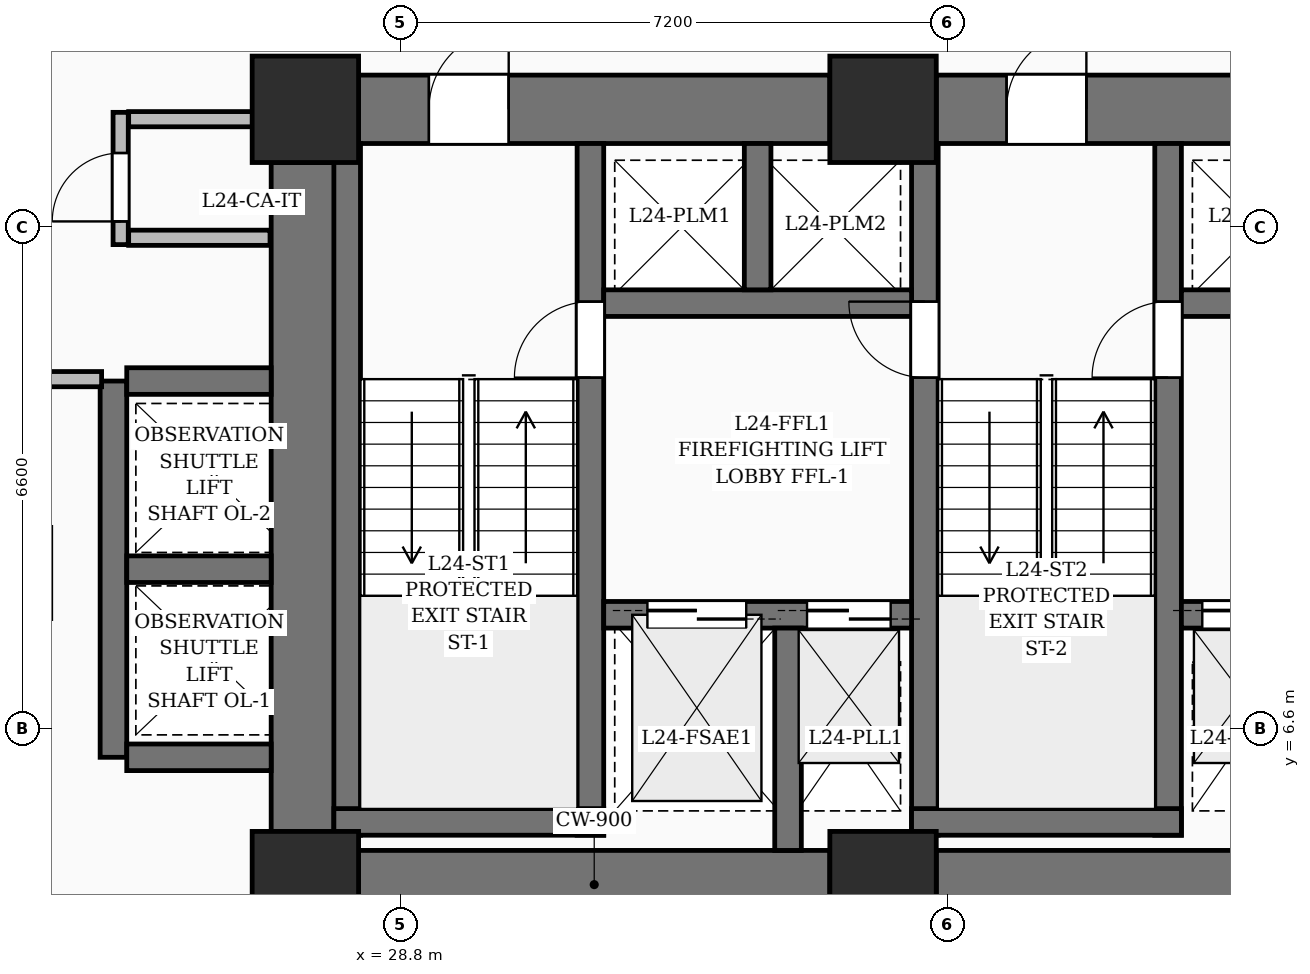
"""IFC4 building model, lengths in metres.
Left out: names, types, materials, properties, quantities, classifications, styles, units other than length and angle.
Written with IfcOpenShell. Run it as: python <this file> out.ifc"""

import sys

from ifc_helpers import new_model, si_unit, direction, frame, frame_2d, origin, origin_2d, place, context, subcontext, project, spatial, rectangle, extrude, element, fill, save


model = new_model("IFC4")
c1 = context("Model", 3, precision=1e-05, world=origin(), true_north=direction((0.0, 1.0)))
c2 = subcontext(c1, "Body", "Model", "MODEL_VIEW")
j1 = project(units=[si_unit("LENGTHUNIT", "METRE"), si_unit("PLANEANGLEUNIT", "RADIAN")], contexts=[c1])
p1 = place(None, origin())
s1 = spatial("IfcSite", under=j1, at=p1, CompositionType="ELEMENT")
p2 = place(p1, origin())
s2 = spatial("IfcBuilding", under=s1, at=p2, CompositionType="ELEMENT")
p3 = place(p2, frame((0.0, 0.0, 96.6)))
s3 = spatial("IfcBuildingStorey", under=s2, at=p3, CompositionType="ELEMENT", Elevation=96.6)
for number, where, z_axis, x_axis in (
    (1, (27.55, 4.55, 0.0), (0.0, 0.0, 1.0), (1.0, 0.0, 0.0)),
    (2, (35.15, 4.55, 0.0), (0.0, 0.0, 1.0), (1.0, 0.0, 0.0)),
    (3, (27.55, 14.75, 0.0), (0.0, 0.0, 1.0), (1.0, 0.0, 0.0)),
    (4, (35.15, 14.75, 0.0), (0.0, 0.0, 1.0), (1.0, 0.0, 0.0)),
):
    element("IfcColumn", number, at=place(p3, frame(where, z_axis=z_axis, x_axis=x_axis)), inside=s3, PredefinedType="COLUMN", context=c2, shape_type="SweptSolid", body=[
        extrude(rectangle(XDim=1.4, YDim=1.4, at=origin_2d()), origin(), (0.0, 0.0, 1.0), 3.6),
    ])
p4 = place(p3, frame((28.25, 4.55, 0.0), z_axis=(0.0, 0.0, 1.0), x_axis=(1.0, 0.0, 0.0)))
e5 = element("IfcWall", 5, at=p4, inside=s3, PredefinedType="SHEAR", context=c2, shape_type="SweptSolid", body=[
    extrude(rectangle(XDim=6.2, YDim=0.9, at=frame_2d((3.1, 0.0))), origin(), (0.0, 0.0, 1.0), 3.6),
])
p5 = place(p3, frame((35.85, 4.55, 0.0), z_axis=(0.0, 0.0, 1.0), x_axis=(1.0, 0.0, 0.0)))
e6 = element("IfcWall", 6, at=p5, inside=s3, PredefinedType="SHEAR", context=c2, shape_type="SweptSolid", body=[
    extrude(rectangle(XDim=10.5, YDim=0.9, at=frame_2d((5.25, 0.0))), origin(), (0.0, 0.0, 1.0), 3.6),
])
p6 = place(p3, frame((28.25, 14.75, 0.0), z_axis=(0.0, 0.0, 1.0), x_axis=(1.0, 0.0, 0.0)))
e7 = element("IfcWall", 7, at=p6, inside=s3, PredefinedType="SHEAR", context=c2, shape_type="SweptSolid", body=[
    extrude(rectangle(XDim=6.2, YDim=0.9, at=frame_2d((3.1, 0.0))), origin(), (0.0, 0.0, 1.0), 3.6),
])
p7 = place(p6, frame((0.925, 0.0, 0.0)))
e8 = element("IfcOpeningElement", 8, at=p7, cuts=e7, PredefinedType="OPENING", context=c2, shape_type="SweptSolid", body=[
    extrude(rectangle(XDim=1.05, YDim=2.15, at=frame_2d((0.525, 1.075))), frame((0.0, 0.46, 0.0), z_axis=(0.0, -1.0, 0.0), x_axis=(1.0, 0.0, 0.0)), (0.0, 0.0, 1.0), 0.92),
])
p8 = place(p3, frame((35.85, 14.75, 0.0), z_axis=(0.0, 0.0, 1.0), x_axis=(1.0, 0.0, 0.0)))
e9 = element("IfcWall", 9, at=p8, inside=s3, PredefinedType="SHEAR", context=c2, shape_type="SweptSolid", body=[
    extrude(rectangle(XDim=10.5, YDim=0.9, at=frame_2d((5.25, 0.0))), origin(), (0.0, 0.0, 1.0), 3.6),
])
p9 = place(p8, frame((0.925, 0.0, 0.0)))
e10 = element("IfcOpeningElement", 10, at=p9, cuts=e9, PredefinedType="OPENING", context=c2, shape_type="SweptSolid", body=[
    extrude(rectangle(XDim=1.05, YDim=2.15, at=frame_2d((0.525, 1.075))), frame((0.0, 0.46, 0.0), z_axis=(0.0, -1.0, 0.0), x_axis=(1.0, 0.0, 0.0)), (0.0, 0.0, 1.0), 0.92),
])
p10 = place(p8, frame((8.525, 0.0, 0.0)))
e11 = element("IfcOpeningElement", 11, at=p10, cuts=e9, PredefinedType="OPENING", context=c2, shape_type="SweptSolid", body=[
    extrude(rectangle(XDim=1.05, YDim=2.15, at=frame_2d((0.525, 1.075))), frame((0.0, 0.46, 0.0), z_axis=(0.0, -1.0, 0.0), x_axis=(1.0, 0.0, 0.0)), (0.0, 0.0, 1.0), 0.92),
])
p11 = place(p3, frame((27.55, 5.25, 0.0), z_axis=(0.0, 0.0, 1.0), x_axis=(0.0, 1.0, 0.0)))
e12 = element("IfcWall", 12, at=p11, inside=s3, PredefinedType="SHEAR", context=c2, shape_type="SweptSolid", body=[
    extrude(rectangle(XDim=8.8, YDim=0.9, at=frame_2d((4.4, 0.0))), origin(), (0.0, 0.0, 1.0), 3.6),
])
p12 = place(p3, frame((28.1, 5.2, 0.0), z_axis=(0.0, 0.0, 1.0), x_axis=(0.0, 1.0, 0.0)))
e13 = element("IfcWall", 13, at=p12, inside=s3, PredefinedType="SOLIDWALL", context=c2, shape_type="SweptSolid", body=[
    extrude(rectangle(XDim=9.1, YDim=0.35, at=frame_2d((4.55, 0.0))), origin(), (0.0, 0.0, 1.0), 3.6),
])
p13 = place(p3, frame((31.3, 5.2, 0.0), z_axis=(0.0, 0.0, 1.0), x_axis=(0.0, 1.0, 0.0)))
e14 = element("IfcWall", 14, at=p13, inside=s3, PredefinedType="SOLIDWALL", context=c2, shape_type="SweptSolid", body=[
    extrude(rectangle(XDim=9.1, YDim=0.35, at=frame_2d((4.55, 0.0))), origin(), (0.0, 0.0, 1.0), 3.6),
])
p14 = place(p13, frame((6.02, 0.0, 0.0)))
e15 = element("IfcOpeningElement", 15, at=p14, cuts=e14, PredefinedType="OPENING", context=c2, shape_type="SweptSolid", body=[
    extrude(rectangle(XDim=1.0, YDim=2.15, at=frame_2d((0.5, 1.075))), frame((0.0, 0.185, 0.0), z_axis=(0.0, -1.0, 0.0), x_axis=(1.0, 0.0, 0.0)), (0.0, 0.0, 1.0), 0.37),
])
p15 = place(p3, frame((27.925, 5.375, 0.0), z_axis=(0.0, 0.0, 1.0), x_axis=(1.0, 0.0, 0.0)))
e16 = element("IfcWall", 16, at=p15, inside=s3, PredefinedType="SOLIDWALL", context=c2, shape_type="SweptSolid", body=[
    extrude(rectangle(XDim=3.55, YDim=0.35, at=frame_2d((1.775, 0.0))), origin(), (0.0, 0.0, 1.0), 3.6),
])
p16 = place(p3, frame((35.7, 5.2, 0.0), z_axis=(0.0, 0.0, 1.0), x_axis=(0.0, 1.0, 0.0)))
e17 = element("IfcWall", 17, at=p16, inside=s3, PredefinedType="SOLIDWALL", context=c2, shape_type="SweptSolid", body=[
    extrude(rectangle(XDim=9.1, YDim=0.35, at=frame_2d((4.55, 0.0))), origin(), (0.0, 0.0, 1.0), 3.6),
])
p17 = place(p16, frame((6.02, 0.0, 0.0)))
e18 = element("IfcOpeningElement", 18, at=p17, cuts=e17, PredefinedType="OPENING", context=c2, shape_type="SweptSolid", body=[
    extrude(rectangle(XDim=1.0, YDim=2.15, at=frame_2d((0.5, 1.075))), frame((0.0, 0.185, 0.0), z_axis=(0.0, -1.0, 0.0), x_axis=(1.0, 0.0, 0.0)), (0.0, 0.0, 1.0), 0.37),
])
p18 = place(p3, frame((38.9, 5.2, 0.0), z_axis=(0.0, 0.0, 1.0), x_axis=(0.0, 1.0, 0.0)))
e19 = element("IfcWall", 19, at=p18, inside=s3, PredefinedType="SOLIDWALL", context=c2, shape_type="SweptSolid", body=[
    extrude(rectangle(XDim=9.1, YDim=0.35, at=frame_2d((4.55, 0.0))), origin(), (0.0, 0.0, 1.0), 3.6),
])
p19 = place(p18, frame((6.02, 0.0, 0.0)))
e20 = element("IfcOpeningElement", 20, at=p19, cuts=e19, PredefinedType="OPENING", context=c2, shape_type="SweptSolid", body=[
    extrude(rectangle(XDim=1.0, YDim=2.15, at=frame_2d((0.5, 1.075))), frame((0.0, 0.185, 0.0), z_axis=(0.0, -1.0, 0.0), x_axis=(1.0, 0.0, 0.0)), (0.0, 0.0, 1.0), 0.37),
])
p20 = place(p3, frame((35.525, 5.375, 0.0), z_axis=(0.0, 0.0, 1.0), x_axis=(1.0, 0.0, 0.0)))
e21 = element("IfcWall", 21, at=p20, inside=s3, PredefinedType="SOLIDWALL", context=c2, shape_type="SweptSolid", body=[
    extrude(rectangle(XDim=3.55, YDim=0.35, at=frame_2d((1.775, 0.0))), origin(), (0.0, 0.0, 1.0), 3.6),
])
p21 = place(p3, frame((31.475, 8.1, 0.0), z_axis=(0.0, 0.0, 1.0), x_axis=(1.0, 0.0, 0.0)))
e22 = element("IfcWall", 22, at=p21, inside=s3, PredefinedType="SOLIDWALL", context=c2, shape_type="SweptSolid", body=[
    extrude(rectangle(XDim=4.05, YDim=0.35, at=frame_2d((2.025, 0.0))), origin(), (0.0, 0.0, 1.0), 3.6),
])
p22 = place(p21, frame((0.575, 0.0, 0.0)))
e23 = element("IfcOpeningElement", 23, at=p22, cuts=e22, PredefinedType="OPENING", context=c2, shape_type="SweptSolid", body=[
    extrude(rectangle(XDim=1.3, YDim=2.25, at=frame_2d((0.65, 1.125))), frame((0.0, 0.185, 0.0), z_axis=(0.0, -1.0, 0.0), x_axis=(1.0, 0.0, 0.0)), (0.0, 0.0, 1.0), 0.37),
])
p23 = place(p21, frame((2.675, 0.0, 0.0)))
e24 = element("IfcOpeningElement", 24, at=p23, cuts=e22, PredefinedType="OPENING", context=c2, shape_type="SweptSolid", body=[
    extrude(rectangle(XDim=1.1, YDim=2.2, at=frame_2d((0.55, 1.1))), frame((0.0, 0.185, 0.0), z_axis=(0.0, -1.0, 0.0), x_axis=(1.0, 0.0, 0.0)), (0.0, 0.0, 1.0), 0.37),
])
p24 = place(p3, frame((39.075, 8.1, 0.0), z_axis=(0.0, 0.0, 1.0), x_axis=(1.0, 0.0, 0.0)))
e25 = element("IfcWall", 25, at=p24, inside=s3, PredefinedType="SOLIDWALL", context=c2, shape_type="SweptSolid", body=[
    extrude(rectangle(XDim=4.05, YDim=0.35, at=frame_2d((2.025, 0.0))), origin(), (0.0, 0.0, 1.0), 3.6),
])
p25 = place(p24, frame((2.175, 0.0, 0.0)))
e26 = element("IfcOpeningElement", 26, at=p25, cuts=e25, PredefinedType="OPENING", context=c2, shape_type="SweptSolid", body=[
    extrude(rectangle(XDim=1.3, YDim=2.25, at=frame_2d((0.65, 1.125))), frame((0.0, 0.185, 0.0), z_axis=(0.0, -1.0, 0.0), x_axis=(1.0, 0.0, 0.0)), (0.0, 0.0, 1.0), 0.37),
])
p26 = place(p24, frame((0.275, 0.0, 0.0)))
e27 = element("IfcOpeningElement", 27, at=p26, cuts=e25, PredefinedType="OPENING", context=c2, shape_type="SweptSolid", body=[
    extrude(rectangle(XDim=1.1, YDim=2.2, at=frame_2d((0.55, 1.1))), frame((0.0, 0.185, 0.0), z_axis=(0.0, -1.0, 0.0), x_axis=(1.0, 0.0, 0.0)), (0.0, 0.0, 1.0), 0.37),
])
p27 = place(p3, frame((33.9, 5.0, 0.0), z_axis=(0.0, 0.0, 1.0), x_axis=(0.0, 1.0, 0.0)))
e28 = element("IfcWall", 28, at=p27, inside=s3, PredefinedType="SOLIDWALL", context=c2, shape_type="SweptSolid", body=[
    extrude(rectangle(XDim=2.925, YDim=0.35, at=frame_2d((1.462, 0.0))), origin(), (0.0, 0.0, 1.0), 3.6),
])
p28 = place(p3, frame((31.475, 12.2, 0.0), z_axis=(0.0, 0.0, 1.0), x_axis=(1.0, 0.0, 0.0)))
e29 = element("IfcWall", 29, at=p28, inside=s3, PredefinedType="SOLIDWALL", context=c2, shape_type="SweptSolid", body=[
    extrude(rectangle(XDim=4.05, YDim=0.35, at=frame_2d((2.025, 0.0))), origin(), (0.0, 0.0, 1.0), 3.6),
])
p29 = place(p3, frame((33.5, 12.375, 0.0), z_axis=(0.0, 0.0, 1.0), x_axis=(0.0, 1.0, 0.0)))
e30 = element("IfcWall", 30, at=p29, inside=s3, PredefinedType="SOLIDWALL", context=c2, shape_type="SweptSolid", body=[
    extrude(rectangle(XDim=1.925, YDim=0.35, at=frame_2d((0.962, 0.0))), origin(), (0.0, 0.0, 1.0), 3.6),
])
p30 = place(p3, frame((39.075, 12.2, 0.0), z_axis=(0.0, 0.0, 1.0), x_axis=(1.0, 0.0, 0.0)))
e31 = element("IfcWall", 31, at=p30, inside=s3, PredefinedType="SOLIDWALL", context=c2, shape_type="SweptSolid", body=[
    extrude(rectangle(XDim=4.05, YDim=0.35, at=frame_2d((2.025, 0.0))), origin(), (0.0, 0.0, 1.0), 3.6),
])
p31 = place(p3, frame((25.025, 6.225, 0.0), z_axis=(0.0, 0.0, 1.0), x_axis=(0.0, 1.0, 0.0)))
e32 = element("IfcWall", 32, at=p31, inside=s3, PredefinedType="SOLIDWALL", context=c2, shape_type="SweptSolid", body=[
    extrude(rectangle(XDim=4.95, YDim=0.35, at=frame_2d((2.475, 0.0))), origin(), (0.0, 0.0, 1.0), 3.6),
])
for number, where, z_axis, x_axis in (
    (33, (25.2, 6.225, 0.0), (0.0, 0.0, 1.0), (1.0, 0.0, 0.0)),
    (34, (25.2, 8.7, 0.0), (0.0, 0.0, 1.0), (1.0, 0.0, 0.0)),
    (35, (25.2, 11.175, 0.0), (0.0, 0.0, 1.0), (1.0, 0.0, 0.0)),
):
    element("IfcWall", number, at=place(p3, frame(where, z_axis=z_axis, x_axis=x_axis)), inside=s3, PredefinedType="SOLIDWALL", context=c2, shape_type="SweptSolid", body=[
        extrude(rectangle(XDim=1.9, YDim=0.35, at=frame_2d((0.95, 0.0))), origin(), (0.0, 0.0, 1.0), 3.6),
    ])
p32 = place(p3, frame((25.12, 12.97, 0.0), z_axis=(0.0, 0.0, 1.0), x_axis=(0.0, 1.0, 0.0)))
e36 = element("IfcWall", 36, at=p32, inside=s3, PredefinedType="PARTITIONING", context=c2, shape_type="SweptSolid", body=[
    extrude(rectangle(XDim=1.74, YDim=0.2, at=frame_2d((0.87, 0.0))), origin(), (0.0, 0.0, 1.0), 3.3),
])
p33 = place(p32, frame((0.305, 0.0, 0.0)))
e37 = element("IfcOpeningElement", 37, at=p33, cuts=e36, PredefinedType="OPENING", context=c2, shape_type="SweptSolid", body=[
    extrude(rectangle(XDim=0.9, YDim=2.1, at=frame_2d((0.45, 1.05))), frame((0.0, 0.11, 0.0), z_axis=(0.0, -1.0, 0.0), x_axis=(1.0, 0.0, 0.0)), (0.0, 0.0, 1.0), 0.22),
])
for number, where, z_axis, x_axis in (
    (38, (25.225, 14.62, 0.0), (0.0, 0.0, 1.0), (1.0, 0.0, 0.0)),
    (39, (25.225, 13.06, 0.0), (0.0, 0.0, 1.0), (1.0, 0.0, 0.0)),
):
    element("IfcWall", number, at=place(p3, frame(where, z_axis=z_axis, x_axis=x_axis)), inside=s3, PredefinedType="PARTITIONING", context=c2, shape_type="SweptSolid", body=[
        extrude(rectangle(XDim=1.86, YDim=0.2, at=frame_2d((0.93, 0.0))), origin(), (0.0, 0.0, 1.0), 3.3),
    ])
p34 = place(p3, frame((21.485, 11.2, 0.0), z_axis=(0.0, 0.0, 1.0), x_axis=(1.0, 0.0, 0.0)))
e40 = element("IfcWall", 40, at=p34, inside=s3, PredefinedType="PARTITIONING", context=c2, shape_type="SweptSolid", body=[
    extrude(rectangle(XDim=3.384, YDim=0.2, at=frame_2d((1.692, 0.0))), origin(), (0.0, 0.0, 1.0), 3.3),
])
p35 = place(p34, frame((0.905, 0.0, 0.0)))
e41 = element("IfcOpeningElement", 41, at=p35, cuts=e40, PredefinedType="OPENING", context=c2, shape_type="SweptSolid", body=[
    extrude(rectangle(XDim=1.6, YDim=2.3, at=frame_2d((0.8, 1.15))), frame((0.0, 0.11, 0.0), z_axis=(0.0, -1.0, 0.0), x_axis=(1.0, 0.0, 0.0)), (0.0, 0.0, 1.0), 0.22),
])
p36 = place(p7, origin())
e42 = element("IfcDoor", 42, at=p36, inside=s3, OperationType="SINGLE_SWING_RIGHT", PredefinedType="DOOR", context=c2, shape_type="SweptSolid", body=[
    extrude(rectangle(XDim=1.05, YDim=2.15, at=frame_2d((0.525, 1.075))), frame((0.0, 0.025, 0.0), z_axis=(0.0, -1.0, 0.0), x_axis=(1.0, 0.0, 0.0)), (0.0, 0.0, 1.0), 0.05),
])
fill(e8, e42)
p37 = place(p9, origin())
e43 = element("IfcDoor", 43, at=p37, inside=s3, OperationType="SINGLE_SWING_RIGHT", PredefinedType="DOOR", context=c2, shape_type="SweptSolid", body=[
    extrude(rectangle(XDim=1.05, YDim=2.15, at=frame_2d((0.525, 1.075))), frame((0.0, 0.025, 0.0), z_axis=(0.0, -1.0, 0.0), x_axis=(1.0, 0.0, 0.0)), (0.0, 0.0, 1.0), 0.05),
])
fill(e10, e43)
p38 = place(p14, origin())
e44 = element("IfcDoor", 44, at=p38, inside=s3, OperationType="SINGLE_SWING_LEFT", PredefinedType="DOOR", context=c2, shape_type="SweptSolid", body=[
    extrude(rectangle(XDim=1.0, YDim=2.15, at=frame_2d((0.5, 1.075))), frame((0.0, 0.025, 0.0), z_axis=(0.0, -1.0, 0.0), x_axis=(1.0, 0.0, 0.0)), (0.0, 0.0, 1.0), 0.05),
])
fill(e15, e44)
p39 = place(p17, origin())
e45 = element("IfcDoor", 45, at=p39, inside=s3, OperationType="SINGLE_SWING_RIGHT", PredefinedType="DOOR", context=c2, shape_type="SweptSolid", body=[
    extrude(rectangle(XDim=1.0, YDim=2.15, at=frame_2d((0.5, 1.075))), frame((0.0, 0.025, 0.0), z_axis=(0.0, -1.0, 0.0), x_axis=(1.0, 0.0, 0.0)), (0.0, 0.0, 1.0), 0.05),
])
fill(e18, e45)
p40 = place(p19, origin())
e46 = element("IfcDoor", 46, at=p40, inside=s3, OperationType="SINGLE_SWING_LEFT", PredefinedType="DOOR", context=c2, shape_type="SweptSolid", body=[
    extrude(rectangle(XDim=1.0, YDim=2.15, at=frame_2d((0.5, 1.075))), frame((0.0, 0.025, 0.0), z_axis=(0.0, -1.0, 0.0), x_axis=(1.0, 0.0, 0.0)), (0.0, 0.0, 1.0), 0.05),
])
fill(e20, e46)
p41 = place(p22, origin())
e47 = element("IfcDoor", 47, at=p41, inside=s3, OperationType="DOUBLE_DOOR_SLIDING", PredefinedType="DOOR", context=c2, shape_type="SweptSolid", body=[
    extrude(rectangle(XDim=1.3, YDim=2.25, at=frame_2d((0.65, 1.125))), frame((0.0, 0.025, 0.0), z_axis=(0.0, -1.0, 0.0), x_axis=(1.0, 0.0, 0.0)), (0.0, 0.0, 1.0), 0.05),
])
fill(e23, e47)
p42 = place(p23, origin())
e48 = element("IfcDoor", 48, at=p42, inside=s3, OperationType="DOUBLE_DOOR_SLIDING", PredefinedType="DOOR", context=c2, shape_type="SweptSolid", body=[
    extrude(rectangle(XDim=1.1, YDim=2.2, at=frame_2d((0.55, 1.1))), frame((0.0, 0.025, 0.0), z_axis=(0.0, -1.0, 0.0), x_axis=(1.0, 0.0, 0.0)), (0.0, 0.0, 1.0), 0.05),
])
fill(e24, e48)
p43 = place(p26, origin())
e49 = element("IfcDoor", 49, at=p43, inside=s3, OperationType="DOUBLE_DOOR_SLIDING", PredefinedType="DOOR", context=c2, shape_type="SweptSolid", body=[
    extrude(rectangle(XDim=1.1, YDim=2.2, at=frame_2d((0.55, 1.1))), frame((0.0, 0.025, 0.0), z_axis=(0.0, -1.0, 0.0), x_axis=(1.0, 0.0, 0.0)), (0.0, 0.0, 1.0), 0.05),
])
fill(e27, e49)
p44 = place(p33, origin())
e50 = element("IfcDoor", 50, at=p44, inside=s3, OperationType="SINGLE_SWING_LEFT", PredefinedType="DOOR", context=c2, shape_type="SweptSolid", body=[
    extrude(rectangle(XDim=0.9, YDim=2.1, at=frame_2d((0.45, 1.05))), frame((0.0, 0.025, 0.0), z_axis=(0.0, -1.0, 0.0), x_axis=(1.0, 0.0, 0.0)), (0.0, 0.0, 1.0), 0.05),
])
fill(e37, e50)
save(model, sys.argv[1])
